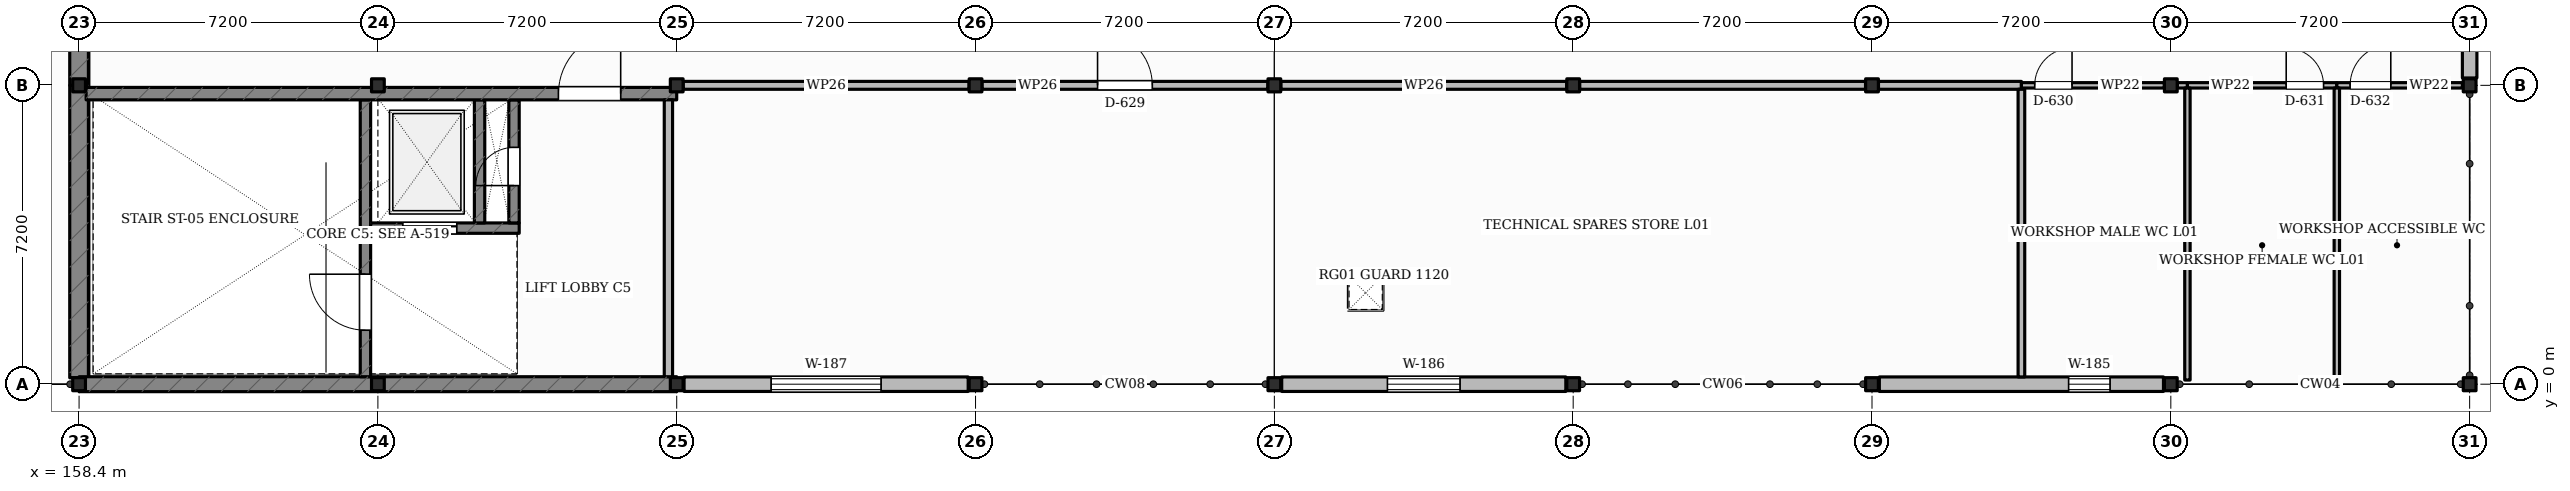
"""IFC4 building model, lengths in metres.
Left out: names, types, materials, properties, quantities, classifications, styles, units other than length and angle.
Written with IfcOpenShell. Run it as: python <this file> out.ifc"""

import sys

from ifc_helpers import new_model, si_unit, direction, frame, frame_2d, origin, origin_2d, place, context, subcontext, project, spatial, rectangle, i_section, extrude, element, fill, save


model = new_model("IFC4")
c1 = context("Model", 3, precision=1e-05, world=origin(), true_north=direction((0.0, 1.0)))
c2 = subcontext(c1, "Body", "Model", "MODEL_VIEW")
j1 = project(units=[si_unit("LENGTHUNIT", "METRE"), si_unit("PLANEANGLEUNIT", "RADIAN")], contexts=[c1])
p1 = place(None, origin())
s1 = spatial("IfcSite", under=j1, at=p1, CompositionType="ELEMENT")
p2 = place(p1, origin())
s2 = spatial("IfcBuilding", under=s1, at=p2, CompositionType="ELEMENT")
p3 = place(p2, frame((0.0, 0.0, 5.4)))
s3 = spatial("IfcBuildingStorey", under=s2, at=p3, CompositionType="ELEMENT", Elevation=5.4)
for number, where, z_axis, x_axis in (
    (1, (158.4, 0.0, 0.0), (0.0, 0.0, 1.0), (1.0, 0.0, 0.0)),
    (2, (158.4, 7.2, 0.0), (0.0, 0.0, 1.0), (1.0, 0.0, 0.0)),
    (3, (165.6, 0.0, 0.0), (0.0, 0.0, 1.0), (1.0, 0.0, 0.0)),
    (4, (165.6, 7.2, 0.0), (0.0, 0.0, 1.0), (1.0, 0.0, 0.0)),
    (5, (172.8, 0.0, 0.0), (0.0, 0.0, 1.0), (1.0, 0.0, 0.0)),
    (6, (172.8, 7.2, 0.0), (0.0, 0.0, 1.0), (1.0, 0.0, 0.0)),
    (7, (180.0, 0.0, 0.0), (0.0, 0.0, 1.0), (1.0, 0.0, 0.0)),
    (8, (180.0, 7.2, 0.0), (0.0, 0.0, 1.0), (1.0, 0.0, 0.0)),
    (9, (187.2, 0.0, 0.0), (0.0, 0.0, 1.0), (1.0, 0.0, 0.0)),
    (10, (187.2, 7.2, 0.0), (0.0, 0.0, 1.0), (1.0, 0.0, 0.0)),
    (11, (194.4, 0.0, 0.0), (0.0, 0.0, 1.0), (1.0, 0.0, 0.0)),
    (12, (194.4, 7.2, 0.0), (0.0, 0.0, 1.0), (1.0, 0.0, 0.0)),
    (13, (201.6, 0.0, 0.0), (0.0, 0.0, 1.0), (1.0, 0.0, 0.0)),
    (14, (201.6, 7.2, 0.0), (0.0, 0.0, 1.0), (1.0, 0.0, 0.0)),
    (15, (208.8, 0.0, 0.0), (0.0, 0.0, 1.0), (1.0, 0.0, 0.0)),
    (16, (208.8, 7.2, 0.0), (0.0, 0.0, 1.0), (1.0, 0.0, 0.0)),
    (17, (216.0, 0.0, 0.0), (0.0, 0.0, 1.0), (1.0, 0.0, 0.0)),
    (18, (216.0, 7.2, 0.0), (0.0, 0.0, 1.0), (1.0, 0.0, 0.0)),
):
    element("IfcColumn", number, at=place(p3, frame(where, z_axis=z_axis, x_axis=x_axis)), inside=s3, PredefinedType="COLUMN", context=c2, shape_type="SweptSolid", body=[
        extrude(i_section(OverallWidth=0.307, OverallDepth=0.314, WebThickness=0.012, FlangeThickness=0.019, FilletRadius=0.015, at=origin_2d()), origin(), (0.0, 0.0, 1.0), 4.5),
    ])
p4 = place(p3, frame((158.4, 0.154, 0.0), z_axis=(0.0, 0.0, 1.0), x_axis=(0.0, 1.0, 0.0)))
e19 = element("IfcWall", 19, at=p4, inside=s3, PredefinedType="SOLIDWALL", context=c2, shape_type="SweptSolid", body=[
    extrude(rectangle(XDim=7.046, YDim=0.45, at=frame_2d((3.523, 0.0))), origin(), (0.0, 0.0, 1.0), 3.553),
])
p5 = place(p3, frame((158.4, 7.2, 0.0), z_axis=(0.0, 0.0, 1.0), x_axis=(0.0, 1.0, 0.0)))
e20 = element("IfcWall", 20, at=p5, inside=s3, PredefinedType="SOLIDWALL", context=c2, shape_type="SweptSolid", body=[
    extrude(rectangle(XDim=7.2, YDim=0.45, at=frame_2d((3.6, 0.0))), origin(), (0.0, 0.0, 1.0), 3.553),
])
p6 = place(p3, frame((216.0, 14.223, 0.0), z_axis=(0.0, 0.0, 1.0), x_axis=(0.0, -1.0, 0.0)))
e21 = element("IfcWall", 21, at=p6, inside=s3, PredefinedType="SOLIDWALL", context=c2, shape_type="SweptSolid", body=[
    extrude(rectangle(XDim=6.845, YDim=0.35, at=frame_2d((3.423, 0.0))), origin(), (0.0, 0.0, 1.0), 3.493),
])
p7 = place(p6, frame((0.861, 0.0, 1.05)))
e22 = element("IfcOpeningElement", 22, at=p7, cuts=e21, PredefinedType="OPENING", context=c2, shape_type="SweptSolid", body=[
    extrude(rectangle(XDim=2.65, YDim=1.6, at=frame_2d((1.325, 0.8))), frame((0.0, 0.185, 0.0), z_axis=(0.0, -1.0, 0.0), x_axis=(1.0, 0.0, 0.0)), (0.0, 0.0, 1.0), 0.37),
])
p8 = place(p3, frame((208.623, 0.0, 0.0), z_axis=(0.0, 0.0, 1.0), x_axis=(-1.0, 0.0, 0.0)))
e23 = element("IfcWall", 23, at=p8, inside=s3, PredefinedType="SOLIDWALL", context=c2, shape_type="SweptSolid", body=[
    extrude(rectangle(XDim=6.846, YDim=0.35, at=frame_2d((3.423, 0.0))), origin(), (0.0, 0.0, 1.0), 3.493),
])
p9 = place(p8, frame((1.286, 0.0, 1.05)))
e24 = element("IfcOpeningElement", 24, at=p9, cuts=e23, PredefinedType="OPENING", context=c2, shape_type="SweptSolid", body=[
    extrude(rectangle(XDim=1.0, YDim=1.6, at=frame_2d((0.5, 0.8))), frame((0.0, 0.185, 0.0), z_axis=(0.0, -1.0, 0.0), x_axis=(1.0, 0.0, 0.0)), (0.0, 0.0, 1.0), 0.37),
])
p10 = place(p3, frame((194.223, 0.0, 0.0), z_axis=(0.0, 0.0, 1.0), x_axis=(-1.0, 0.0, 0.0)))
e25 = element("IfcWall", 25, at=p10, inside=s3, PredefinedType="SOLIDWALL", context=c2, shape_type="SweptSolid", body=[
    extrude(rectangle(XDim=6.846, YDim=0.35, at=frame_2d((3.423, 0.0))), origin(), (0.0, 0.0, 1.0), 3.493),
])
p11 = place(p10, frame((2.548, 0.0, 1.05)))
e26 = element("IfcOpeningElement", 26, at=p11, cuts=e25, PredefinedType="OPENING", context=c2, shape_type="SweptSolid", body=[
    extrude(rectangle(XDim=1.75, YDim=1.85, at=frame_2d((0.875, 0.925))), frame((0.0, 0.185, 0.0), z_axis=(0.0, -1.0, 0.0), x_axis=(1.0, 0.0, 0.0)), (0.0, 0.0, 1.0), 0.37),
])
p12 = place(p3, frame((179.823, 0.0, 0.0), z_axis=(0.0, 0.0, 1.0), x_axis=(-1.0, 0.0, 0.0)))
e27 = element("IfcWall", 27, at=p12, inside=s3, PredefinedType="SOLIDWALL", context=c2, shape_type="SweptSolid", body=[
    extrude(rectangle(XDim=6.845, YDim=0.35, at=frame_2d((3.423, 0.0))), origin(), (0.0, 0.0, 1.0), 3.533),
])
p13 = place(p12, frame((2.098, 0.0, 1.05)))
e28 = element("IfcOpeningElement", 28, at=p13, cuts=e27, PredefinedType="OPENING", context=c2, shape_type="SweptSolid", body=[
    extrude(rectangle(XDim=2.65, YDim=1.6, at=frame_2d((1.325, 0.8))), frame((0.0, 0.185, 0.0), z_axis=(0.0, -1.0, 0.0), x_axis=(1.0, 0.0, 0.0)), (0.0, 0.0, 1.0), 0.37),
])
p14 = place(p3, frame((172.8, 0.0, 0.0), z_axis=(0.0, 0.0, 1.0), x_axis=(-1.0, 0.0, 0.0)))
e29 = element("IfcWall", 29, at=p14, inside=s3, PredefinedType="SHEAR", context=c2, shape_type="SweptSolid", body=[
    extrude(rectangle(XDim=7.2, YDim=0.36, at=frame_2d((3.6, 0.0))), origin(), (0.0, 0.0, 1.0), 3.533),
])
p15 = place(p3, frame((165.6, 0.0, 0.0), z_axis=(0.0, 0.0, 1.0), x_axis=(-1.0, 0.0, 0.0)))
e30 = element("IfcWall", 30, at=p15, inside=s3, PredefinedType="SHEAR", context=c2, shape_type="SweptSolid", body=[
    extrude(rectangle(XDim=7.2, YDim=0.36, at=frame_2d((3.6, 0.0))), origin(), (0.0, 0.0, 1.0), 3.533),
])
p16 = place(p3, frame((165.3, 0.18, 0.0), z_axis=(0.0, 0.0, 1.0), x_axis=(0.0, 1.0, 0.0)))
e31 = element("IfcWall", 31, at=p16, inside=s3, PredefinedType="SHEAR", context=c2, shape_type="SweptSolid", body=[
    extrude(rectangle(XDim=6.67, YDim=0.25, at=frame_2d((3.335, 0.0))), origin(), (0.0, 0.0, 1.0), 3.55),
])
p17 = place(p16, frame((1.12, 0.0, 0.0)))
e32 = element("IfcOpeningElement", 32, at=p17, cuts=e31, PredefinedType="OPENING", context=c2, shape_type="SweptSolid", body=[
    extrude(rectangle(XDim=1.35, YDim=2.15, at=frame_2d((0.675, 1.075))), frame((0.0, 0.135, 0.0), z_axis=(0.0, -1.0, 0.0), x_axis=(1.0, 0.0, 0.0)), (0.0, 0.0, 1.0), 0.27),
])
p18 = place(p3, frame((165.425, 3.76, 0.0), z_axis=(0.0, 0.0, 1.0), x_axis=(1.0, 0.0, 0.0)))
e33 = element("IfcWall", 33, at=p18, inside=s3, PredefinedType="SHEAR", context=c2, shape_type="SweptSolid", body=[
    extrude(rectangle(XDim=3.58, YDim=0.25, at=frame_2d((1.79, 0.0))), origin(), (0.0, 0.0, 1.0), 3.55),
])
p19 = place(p18, frame((0.775, 0.0, 0.0)))
e34 = element("IfcOpeningElement", 34, at=p19, cuts=e33, PredefinedType="OPENING", context=c2, shape_type="SweptSolid", body=[
    extrude(rectangle(XDim=1.3, YDim=2.2, at=frame_2d((0.65, 1.1))), frame((0.0, 0.135, 0.0), z_axis=(0.0, -1.0, 0.0), x_axis=(1.0, 0.0, 0.0)), (0.0, 0.0, 1.0), 0.27),
])
p20 = place(p3, frame((168.05, 3.885, 0.0), z_axis=(0.0, 0.0, 1.0), x_axis=(0.0, 1.0, 0.0)))
e35 = element("IfcWall", 35, at=p20, inside=s3, PredefinedType="SHEAR", context=c2, shape_type="SweptSolid", body=[
    extrude(rectangle(XDim=2.965, YDim=0.25, at=frame_2d((1.482, 0.0))), origin(), (0.0, 0.0, 1.0), 3.55),
])
p21 = place(p3, frame((168.88, 3.885, 0.0), z_axis=(0.0, 0.0, 1.0), x_axis=(0.0, 1.0, 0.0)))
e36 = element("IfcWall", 36, at=p21, inside=s3, PredefinedType="SHEAR", context=c2, shape_type="SweptSolid", body=[
    extrude(rectangle(XDim=2.965, YDim=0.25, at=frame_2d((1.482, 0.0))), origin(), (0.0, 0.0, 1.0), 3.55),
])
p22 = place(p21, frame((0.9, 0.0, 0.0)))
e37 = element("IfcOpeningElement", 37, at=p22, cuts=e36, PredefinedType="OPENING", context=c2, shape_type="SweptSolid", body=[
    extrude(rectangle(XDim=0.92, YDim=2.05, at=frame_2d((0.46, 1.025))), frame((0.0, 0.135, 0.0), z_axis=(0.0, -1.0, 0.0), x_axis=(1.0, 0.0, 0.0)), (0.0, 0.0, 1.0), 0.27),
])
p23 = place(p3, frame((158.57, 7.0, 0.0), z_axis=(0.0, 0.0, 1.0), x_axis=(1.0, 0.0, 0.0)))
e38 = element("IfcWall", 38, at=p23, inside=s3, PredefinedType="SHEAR", context=c2, shape_type="SweptSolid", body=[
    extrude(rectangle(XDim=14.23, YDim=0.3, at=frame_2d((7.115, 0.0))), origin(), (0.0, 0.0, 1.0), 3.55),
])
p24 = place(p23, frame((11.38, 0.0, 0.0)))
e39 = element("IfcOpeningElement", 39, at=p24, cuts=e38, PredefinedType="OPENING", context=c2, shape_type="SweptSolid", body=[
    extrude(rectangle(XDim=1.5, YDim=2.15, at=frame_2d((0.75, 1.075))), frame((0.0, 0.16, 0.0), z_axis=(0.0, -1.0, 0.0), x_axis=(1.0, 0.0, 0.0)), (0.0, 0.0, 1.0), 0.32),
])
p25 = place(p3, frame((172.6, 0.18, 0.0), z_axis=(0.0, 0.0, 1.0), x_axis=(0.0, 1.0, 0.0)))
e40 = element("IfcWall", 40, at=p25, inside=s3, PredefinedType="SOLIDWALL", context=c2, shape_type="SweptSolid", body=[
    extrude(rectangle(XDim=6.67, YDim=0.2, at=frame_2d((3.335, 0.0))), origin(), (0.0, 0.0, 1.0), 3.528),
])
p26 = place(p3, frame((172.956, 7.2, 0.0), z_axis=(0.0, 0.0, 1.0), x_axis=(1.0, 0.0, 0.0)))
e41 = element("IfcWall", 41, at=p26, inside=s3, PredefinedType="PARTITIONING", context=c2, shape_type="SweptSolid", body=[
    extrude(rectangle(XDim=6.888, YDim=0.19, at=frame_2d((3.444, 0.0))), origin(), (0.0, 0.0, 1.0), 3.528),
])
p27 = place(p3, frame((180.156, 7.2, 0.0), z_axis=(0.0, 0.0, 1.0), x_axis=(1.0, 0.0, 0.0)))
e42 = element("IfcWall", 42, at=p27, inside=s3, PredefinedType="PARTITIONING", context=c2, shape_type="SweptSolid", body=[
    extrude(rectangle(XDim=6.888, YDim=0.19, at=frame_2d((3.444, 0.0))), origin(), (0.0, 0.0, 1.0), 3.488),
])
p28 = place(p27, frame((2.784, 0.0, 0.0)))
e43 = element("IfcOpeningElement", 43, at=p28, cuts=e42, PredefinedType="OPENING", context=c2, shape_type="SweptSolid", body=[
    extrude(rectangle(XDim=1.32, YDim=2.2, at=frame_2d((0.66, 1.1))), frame((0.0, 0.105, 0.0), z_axis=(0.0, -1.0, 0.0), x_axis=(1.0, 0.0, 0.0)), (0.0, 0.0, 1.0), 0.21),
])
p29 = place(p3, frame((187.356, 7.2, 0.0), z_axis=(0.0, 0.0, 1.0), x_axis=(1.0, 0.0, 0.0)))
e44 = element("IfcWall", 44, at=p29, inside=s3, PredefinedType="PARTITIONING", context=c2, shape_type="SweptSolid", body=[
    extrude(rectangle(XDim=6.888, YDim=0.19, at=frame_2d((3.444, 0.0))), origin(), (0.0, 0.0, 1.0), 3.488),
])
p30 = place(p3, frame((194.556, 7.2, 0.0), z_axis=(0.0, 0.0, 1.0), x_axis=(1.0, 0.0, 0.0)))
e45 = element("IfcWall", 45, at=p30, inside=s3, PredefinedType="PARTITIONING", context=c2, shape_type="SweptSolid", body=[
    extrude(rectangle(XDim=6.888, YDim=0.19, at=frame_2d((3.444, 0.0))), origin(), (0.0, 0.0, 1.0), 3.488),
])
p31 = place(p3, frame((201.756, 7.2, 0.0), z_axis=(0.0, 0.0, 1.0), x_axis=(1.0, 0.0, 0.0)))
e46 = element("IfcWall", 46, at=p31, inside=s3, PredefinedType="PARTITIONING", context=c2, shape_type="SweptSolid", body=[
    extrude(rectangle(XDim=3.444, YDim=0.19, at=frame_2d((1.722, 0.0))), origin(), (0.0, 0.0, 1.0), 3.488),
])
p32 = place(p3, frame((205.2, 7.2, 0.0), z_axis=(0.0, 0.0, 1.0), x_axis=(1.0, 0.0, 0.0)))
e47 = element("IfcWall", 47, at=p32, inside=s3, PredefinedType="PARTITIONING", context=c2, shape_type="SweptSolid", body=[
    extrude(rectangle(XDim=3.444, YDim=0.13, at=frame_2d((1.722, 0.0))), origin(), (0.0, 0.0, 1.0), 3.488),
])
p33 = place(p32, frame((0.32, 0.0, 0.0)))
e48 = element("IfcOpeningElement", 48, at=p33, cuts=e47, PredefinedType="OPENING", context=c2, shape_type="SweptSolid", body=[
    extrude(rectangle(XDim=0.9, YDim=2.05, at=frame_2d((0.45, 1.025))), frame((0.0, 0.075, 0.0), z_axis=(0.0, -1.0, 0.0), x_axis=(1.0, 0.0, 0.0)), (0.0, 0.0, 1.0), 0.15),
])
p34 = place(p3, frame((208.956, 7.2, 0.0), z_axis=(0.0, 0.0, 1.0), x_axis=(1.0, 0.0, 0.0)))
e49 = element("IfcWall", 49, at=p34, inside=s3, PredefinedType="PARTITIONING", context=c2, shape_type="SweptSolid", body=[
    extrude(rectangle(XDim=0.244, YDim=0.13, at=frame_2d((0.122, 0.0))), origin(), (0.0, 0.0, 1.0), 3.488),
])
p35 = place(p3, frame((209.2, 7.2, 0.0), z_axis=(0.0, 0.0, 1.0), x_axis=(1.0, 0.0, 0.0)))
e50 = element("IfcWall", 50, at=p35, inside=s3, PredefinedType="PARTITIONING", context=c2, shape_type="SweptSolid", body=[
    extrude(rectangle(XDim=3.6, YDim=0.13, at=frame_2d((1.8, 0.0))), origin(), (0.0, 0.0, 1.0), 3.55),
])
p36 = place(p35, frame((2.38, 0.0, 0.0)))
e51 = element("IfcOpeningElement", 51, at=p36, cuts=e50, PredefinedType="OPENING", context=c2, shape_type="SweptSolid", body=[
    extrude(rectangle(XDim=0.9, YDim=2.05, at=frame_2d((0.45, 1.025))), frame((0.0, 0.075, 0.0), z_axis=(0.0, -1.0, 0.0), x_axis=(1.0, 0.0, 0.0)), (0.0, 0.0, 1.0), 0.15),
])
p37 = place(p3, frame((212.8, 7.2, 0.0), z_axis=(0.0, 0.0, 1.0), x_axis=(1.0, 0.0, 0.0)))
e52 = element("IfcWall", 52, at=p37, inside=s3, PredefinedType="PARTITIONING", context=c2, shape_type="SweptSolid", body=[
    extrude(rectangle(XDim=3.025, YDim=0.13, at=frame_2d((1.512, 0.0))), origin(), (0.0, 0.0, 1.0), 3.488),
])
p38 = place(p37, frame((0.32, 0.0, 0.0)))
e53 = element("IfcOpeningElement", 53, at=p38, cuts=e52, PredefinedType="OPENING", context=c2, shape_type="SweptSolid", body=[
    extrude(rectangle(XDim=0.98, YDim=2.1, at=frame_2d((0.49, 1.05))), frame((0.0, 0.075, 0.0), z_axis=(0.0, -1.0, 0.0), x_axis=(1.0, 0.0, 0.0)), (0.0, 0.0, 1.0), 0.15),
])
p39 = place(p3, frame((205.2, 0.175, 0.0), z_axis=(0.0, 0.0, 1.0), x_axis=(0.0, 1.0, 0.0)))
e54 = element("IfcWall", 54, at=p39, inside=s3, PredefinedType="PARTITIONING", context=c2, shape_type="SweptSolid", body=[
    extrude(rectangle(XDim=6.93, YDim=0.16, at=frame_2d((3.465, 0.0))), origin(), (0.0, 0.0, 1.0), 3.55),
])
for number, where, z_axis, x_axis in (
    (55, (209.2, 0.1, 0.0), (0.0, 0.0, 1.0), (0.0, 1.0, 0.0)),
    (56, (212.8, 0.1, 0.0), (0.0, 0.0, 1.0), (0.0, 1.0, 0.0)),
):
    element("IfcWall", number, at=place(p3, frame(where, z_axis=z_axis, x_axis=x_axis)), inside=s3, PredefinedType="PARTITIONING", context=c2, shape_type="SweptSolid", body=[
        extrude(rectangle(XDim=7.035, YDim=0.13, at=frame_2d((3.518, 0.0))), origin(), (0.0, 0.0, 1.0), 3.55),
    ])
p40 = place(p9, origin())
e57 = element("IfcWindow", 57, at=p40, inside=s3, PartitioningType="SINGLE_PANEL", PredefinedType="WINDOW", context=c2, shape_type="SweptSolid", body=[
    extrude(rectangle(XDim=1.0, YDim=1.6, at=frame_2d((0.5, 0.8))), frame((0.0, 0.03, 0.0), z_axis=(0.0, -1.0, 0.0), x_axis=(1.0, 0.0, 0.0)), (0.0, 0.0, 1.0), 0.06),
])
fill(e24, e57)
p41 = place(p11, origin())
e58 = element("IfcWindow", 58, at=p41, inside=s3, PartitioningType="SINGLE_PANEL", PredefinedType="WINDOW", context=c2, shape_type="SweptSolid", body=[
    extrude(rectangle(XDim=1.75, YDim=1.85, at=frame_2d((0.875, 0.925))), frame((0.0, 0.03, 0.0), z_axis=(0.0, -1.0, 0.0), x_axis=(1.0, 0.0, 0.0)), (0.0, 0.0, 1.0), 0.06),
])
fill(e26, e58)
p42 = place(p13, origin())
e59 = element("IfcWindow", 59, at=p42, inside=s3, PartitioningType="SINGLE_PANEL", PredefinedType="WINDOW", context=c2, shape_type="SweptSolid", body=[
    extrude(rectangle(XDim=2.65, YDim=1.6, at=frame_2d((1.325, 0.8))), frame((0.0, 0.03, 0.0), z_axis=(0.0, -1.0, 0.0), x_axis=(1.0, 0.0, 0.0)), (0.0, 0.0, 1.0), 0.06),
])
fill(e28, e59)
p43 = place(p17, origin())
e60 = element("IfcDoor", 60, at=p43, inside=s3, OperationType="SINGLE_SWING_RIGHT", PredefinedType="DOOR", context=c2, shape_type="SweptSolid", body=[
    extrude(rectangle(XDim=1.35, YDim=2.15, at=frame_2d((0.675, 1.075))), frame((0.0, 0.025, 0.0), z_axis=(0.0, -1.0, 0.0), x_axis=(1.0, 0.0, 0.0)), (0.0, 0.0, 1.0), 0.05),
])
fill(e32, e60)
p44 = place(p19, origin())
e61 = element("IfcDoor", 61, at=p44, inside=s3, OperationType="SLIDING_TO_LEFT", PredefinedType="DOOR", context=c2, shape_type="SweptSolid", body=[
    extrude(rectangle(XDim=1.3, YDim=2.2, at=frame_2d((0.65, 1.1))), frame((0.0, 0.025, 0.0), z_axis=(0.0, -1.0, 0.0), x_axis=(1.0, 0.0, 0.0)), (0.0, 0.0, 1.0), 0.05),
])
fill(e34, e61)
p45 = place(p22, origin())
e62 = element("IfcDoor", 62, at=p45, inside=s3, OperationType="SINGLE_SWING_LEFT", PredefinedType="DOOR", context=c2, shape_type="SweptSolid", body=[
    extrude(rectangle(XDim=0.92, YDim=2.05, at=frame_2d((0.46, 1.025))), frame((0.0, 0.025, 0.0), z_axis=(0.0, -1.0, 0.0), x_axis=(1.0, 0.0, 0.0)), (0.0, 0.0, 1.0), 0.05),
])
fill(e37, e62)
p46 = place(p24, origin())
e63 = element("IfcDoor", 63, at=p46, inside=s3, OperationType="SINGLE_SWING_RIGHT", PredefinedType="DOOR", context=c2, shape_type="SweptSolid", body=[
    extrude(rectangle(XDim=1.5, YDim=2.15, at=frame_2d((0.75, 1.075))), frame((0.0, 0.025, 0.0), z_axis=(0.0, -1.0, 0.0), x_axis=(1.0, 0.0, 0.0)), (0.0, 0.0, 1.0), 0.05),
])
fill(e39, e63)
p47 = place(p28, origin())
e64 = element("IfcDoor", 64, at=p47, inside=s3, OperationType="SINGLE_SWING_LEFT", PredefinedType="DOOR", context=c2, shape_type="SweptSolid", body=[
    extrude(rectangle(XDim=1.32, YDim=2.2, at=frame_2d((0.66, 1.1))), frame((0.0, 0.025, 0.0), z_axis=(0.0, -1.0, 0.0), x_axis=(1.0, 0.0, 0.0)), (0.0, 0.0, 1.0), 0.05),
])
fill(e43, e64)
p48 = place(p33, origin())
e65 = element("IfcDoor", 65, at=p48, inside=s3, OperationType="SINGLE_SWING_RIGHT", PredefinedType="DOOR", context=c2, shape_type="SweptSolid", body=[
    extrude(rectangle(XDim=0.9, YDim=2.05, at=frame_2d((0.45, 1.025))), frame((0.0, 0.025, 0.0), z_axis=(0.0, -1.0, 0.0), x_axis=(1.0, 0.0, 0.0)), (0.0, 0.0, 1.0), 0.05),
])
fill(e48, e65)
p49 = place(p36, origin())
e66 = element("IfcDoor", 66, at=p49, inside=s3, OperationType="SINGLE_SWING_LEFT", PredefinedType="DOOR", context=c2, shape_type="SweptSolid", body=[
    extrude(rectangle(XDim=0.9, YDim=2.05, at=frame_2d((0.45, 1.025))), frame((0.0, 0.025, 0.0), z_axis=(0.0, -1.0, 0.0), x_axis=(1.0, 0.0, 0.0)), (0.0, 0.0, 1.0), 0.05),
])
fill(e51, e66)
p50 = place(p38, origin())
e67 = element("IfcDoor", 67, at=p50, inside=s3, OperationType="SINGLE_SWING_RIGHT", PredefinedType="DOOR", context=c2, shape_type="SweptSolid", body=[
    extrude(rectangle(XDim=0.98, YDim=2.1, at=frame_2d((0.49, 1.05))), frame((0.0, 0.025, 0.0), z_axis=(0.0, -1.0, 0.0), x_axis=(1.0, 0.0, 0.0)), (0.0, 0.0, 1.0), 0.05),
])
fill(e53, e67)
save(model, sys.argv[1])
